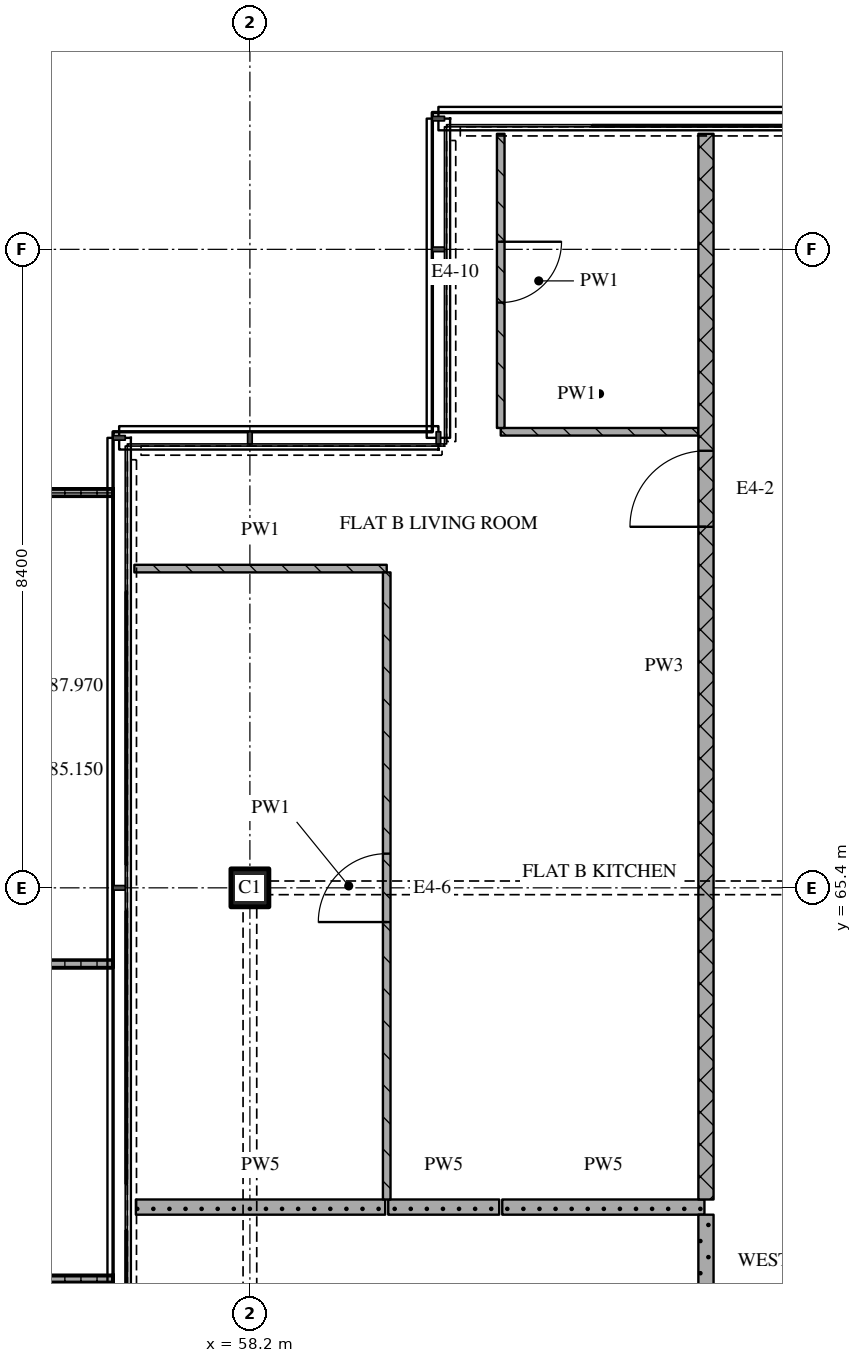
"""IFC4 building model, lengths in metres.
Left out: names, types, materials, properties, quantities, classifications, styles, units other than length and angle.
Written with IfcOpenShell. Run it as: python <this file> out.ifc"""

import sys

from ifc_helpers import new_model, si_unit, direction, frame, frame_2d, origin, origin_2d, place, context, subcontext, project, spatial, polyline, rectangle, outline, extrude, element, fill, save


model = new_model("IFC4")
c1 = context("Model", 3, precision=1e-05, world=origin(), true_north=direction((0.0, 1.0)))
c2 = subcontext(c1, "Body", "Model", "MODEL_VIEW")
j1 = project(units=[si_unit("LENGTHUNIT", "METRE"), si_unit("PLANEANGLEUNIT", "RADIAN")], contexts=[c1])
p1 = place(None, origin())
s1 = spatial("IfcSite", under=j1, at=p1, CompositionType="ELEMENT")
p2 = place(p1, origin())
s2 = spatial("IfcBuilding", under=s1, at=p2, CompositionType="ELEMENT")
p3 = place(p2, frame((0.0, 0.0, 285.15)))
s3 = spatial("IfcBuildingStorey", under=s2, at=p3, CompositionType="ELEMENT", Elevation=285.15)
p4 = place(p3, frame((58.2, 65.4, 0.0), z_axis=(0.0, 0.0, 1.0), x_axis=(1.0, 0.0, 0.0)))
e1 = element("IfcColumn", 1, at=p4, inside=s3, PredefinedType="COLUMN", context=c2, shape_type="SweptSolid", body=[
    extrude(rectangle(XDim=0.5, YDim=0.5, at=origin_2d()), origin(), (0.0, 0.0, 1.0), 3.6),
])
p5 = place(p3, origin())
e2 = element("IfcWall", 2, at=p5, inside=s3, PredefinedType="SOLIDWALL", context=c2, shape_type="SweptSolid", body=[
    extrude(outline(polyline([(56.4, 70.65), (56.4, 70.55), (54.633, 70.55), (54.633, 64.45), (56.4, 64.45), (56.4, 64.35), (54.533, 64.35), (54.533, 70.65), (56.4, 70.65)])), origin(), (0.0, 0.0, 1.0), 1.0),
])
p6 = place(p3, origin())
e3 = element("IfcWall", 3, at=p6, inside=s3, PredefinedType="SOLIDWALL", context=c2, shape_type="SweptSolid", body=[
    extrude(outline(polyline([(56.4, 60.3), (56.4, 60.2), (54.9, 60.2), (54.9, 58.0), (56.4, 58.0), (56.4, 57.9), (54.8, 57.9), (54.8, 60.3), (56.4, 60.3)])), origin(), (0.0, 0.0, 1.0), 1.0),
])
p7 = place(p3, frame((56.7, 61.2, 0.0), z_axis=(0.0, 0.0, 1.0), x_axis=(1.0, 0.0, 0.0)))
e4 = element("IfcWall", 4, at=p7, inside=s3, PredefinedType="PARTITIONING", context=c2, shape_type="SweptSolid", body=[
    extrude(rectangle(XDim=3.28, YDim=0.2, at=frame_2d((1.64, 0.0))), origin(), (0.0, 0.0, 1.0), 3.32),
])
p8 = place(p3, frame((60.02, 61.2, 0.0), z_axis=(0.0, 0.0, 1.0), x_axis=(1.0, 0.0, 0.0)))
e5 = element("IfcWall", 5, at=p8, inside=s3, PredefinedType="PARTITIONING", context=c2, shape_type="SweptSolid", body=[
    extrude(rectangle(XDim=1.46, YDim=0.2, at=frame_2d((0.73, 0.0))), origin(), (0.0, 0.0, 1.0), 3.32),
])
p9 = place(p3, frame((61.52, 61.2, 0.0), z_axis=(0.0, 0.0, 1.0), x_axis=(1.0, 0.0, 0.0)))
e6 = element("IfcWall", 6, at=p9, inside=s3, PredefinedType="PARTITIONING", context=c2, shape_type="SweptSolid", body=[
    extrude(rectangle(XDim=2.66, YDim=0.2, at=frame_2d((1.33, 0.0))), origin(), (0.0, 0.0, 1.0), 3.32),
])
p10 = place(p3, frame((56.68, 69.6, 0.0), z_axis=(0.0, 0.0, 1.0), x_axis=(1.0, 0.0, 0.0)))
e7 = element("IfcWall", 7, at=p10, inside=s3, PredefinedType="PARTITIONING", context=c2, shape_type="SweptSolid", body=[
    extrude(rectangle(XDim=3.32, YDim=0.1, at=frame_2d((1.66, 0.0))), origin(), (0.0, 0.0, 1.0), 3.32),
])
p11 = place(p3, frame((61.5, 71.4, 0.0), z_axis=(0.0, 0.0, 1.0), x_axis=(1.0, 0.0, 0.0)))
e8 = element("IfcWall", 8, at=p11, inside=s3, PredefinedType="PARTITIONING", context=c2, shape_type="SweptSolid", body=[
    extrude(rectangle(XDim=2.6, YDim=0.1, at=frame_2d((1.3, 0.0))), origin(), (0.0, 0.0, 1.0), 3.32),
])
p12 = place(p3, frame((60.0, 61.3, 0.0), z_axis=(0.0, 0.0, 1.0), x_axis=(0.0, 1.0, 0.0)))
e9 = element("IfcWall", 9, at=p12, inside=s3, PredefinedType="PARTITIONING", context=c2, shape_type="SweptSolid", body=[
    extrude(rectangle(XDim=8.25, YDim=0.1, at=frame_2d((4.125, 0.0))), origin(), (0.0, 0.0, 1.0), 3.32),
])
p13 = place(p12, frame((3.65, 0.0, 0.0)))
e10 = element("IfcOpeningElement", 10, at=p13, cuts=e9, PredefinedType="OPENING", context=c2, shape_type="SweptSolid", body=[
    extrude(rectangle(XDim=0.9, YDim=2.1, at=frame_2d((0.45, 1.05))), frame((0.0, 0.06, 0.0), z_axis=(0.0, -1.0, 0.0), x_axis=(1.0, 0.0, 0.0)), (0.0, 0.0, 1.0), 0.12),
])
p14 = place(p3, frame((61.5, 75.32, 0.0), z_axis=(0.0, 0.0, 1.0), x_axis=(0.0, -1.0, 0.0)))
e11 = element("IfcWall", 11, at=p14, inside=s3, PredefinedType="PARTITIONING", context=c2, shape_type="SweptSolid", body=[
    extrude(rectangle(XDim=3.87, YDim=0.1, at=frame_2d((1.935, 0.0))), origin(), (0.0, 0.0, 1.0), 3.32),
])
p15 = place(p14, frame((1.42, 0.0, 0.0)))
e12 = element("IfcOpeningElement", 12, at=p15, cuts=e11, PredefinedType="OPENING", context=c2, shape_type="SweptSolid", body=[
    extrude(rectangle(XDim=0.8, YDim=2.1, at=frame_2d((0.4, 1.05))), frame((0.0, 0.06, 0.0), z_axis=(0.0, -1.0, 0.0), x_axis=(1.0, 0.0, 0.0)), (0.0, 0.0, 1.0), 0.12),
])
p16 = place(p3, frame((64.2, 61.3, 0.0), z_axis=(0.0, 0.0, 1.0), x_axis=(0.0, 1.0, 0.0)))
e13 = element("IfcWall", 13, at=p16, inside=s3, PredefinedType="PARTITIONING", context=c2, shape_type="SweptSolid", body=[
    extrude(rectangle(XDim=14.02, YDim=0.2, at=frame_2d((7.01, 0.0))), origin(), (0.0, 0.0, 1.0), 3.32),
])
p17 = place(p16, frame((8.85, 0.0, 0.0)))
e14 = element("IfcOpeningElement", 14, at=p17, cuts=e13, PredefinedType="OPENING", context=c2, shape_type="SweptSolid", body=[
    extrude(rectangle(XDim=1.0, YDim=2.1, at=frame_2d((0.5, 1.05))), frame((0.0, 0.11, 0.0), z_axis=(0.0, -1.0, 0.0), x_axis=(1.0, 0.0, 0.0)), (0.0, 0.0, 1.0), 0.22),
])
p18 = place(p3, frame((64.2, 61.1, 0.0), z_axis=(0.0, 0.0, 1.0), x_axis=(0.0, -1.0, 0.0)))
e15 = element("IfcWall", 15, at=p18, inside=s3, PredefinedType="PARTITIONING", context=c2, shape_type="SweptSolid", body=[
    extrude(rectangle(XDim=2.2, YDim=0.2, at=frame_2d((1.1, 0.0))), origin(), (0.0, 0.0, 1.0), 3.32),
])
p19 = place(p13, origin())
e16 = element("IfcDoor", 16, at=p19, inside=s3, OperationType="SINGLE_SWING_LEFT", PredefinedType="DOOR", context=c2, shape_type="SweptSolid", body=[
    extrude(rectangle(XDim=0.9, YDim=2.1, at=frame_2d((0.45, 1.05))), frame((0.0, 0.025, 0.0), z_axis=(0.0, -1.0, 0.0), x_axis=(1.0, 0.0, 0.0)), (0.0, 0.0, 1.0), 0.05),
])
fill(e10, e16)
p20 = place(p15, origin())
e17 = element("IfcDoor", 17, at=p20, inside=s3, OperationType="SINGLE_SWING_LEFT", PredefinedType="DOOR", context=c2, shape_type="SweptSolid", body=[
    extrude(rectangle(XDim=0.8, YDim=2.1, at=frame_2d((0.4, 1.05))), frame((0.0, 0.025, 0.0), z_axis=(0.0, -1.0, 0.0), x_axis=(1.0, 0.0, 0.0)), (0.0, 0.0, 1.0), 0.05),
])
fill(e12, e17)
p21 = place(p17, origin())
e18 = element("IfcDoor", 18, at=p21, inside=s3, OperationType="SINGLE_SWING_LEFT", PredefinedType="DOOR", context=c2, shape_type="SweptSolid", body=[
    extrude(rectangle(XDim=1.0, YDim=2.1, at=frame_2d((0.5, 1.05))), frame((0.0, 0.025, 0.0), z_axis=(0.0, -1.0, 0.0), x_axis=(1.0, 0.0, 0.0)), (0.0, 0.0, 1.0), 0.05),
])
fill(e14, e18)
save(model, sys.argv[1])
